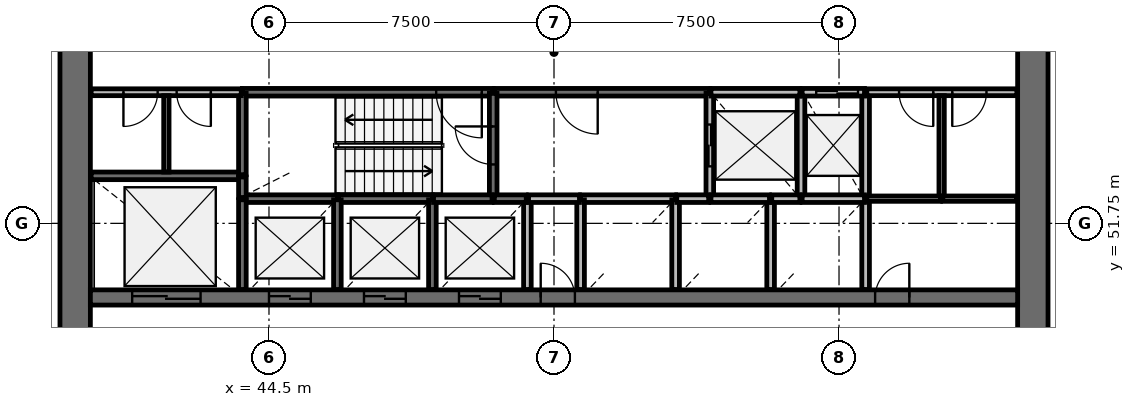
"""IFC4 building model, lengths in metres.
Left out: names, types, materials, properties, quantities, classifications, styles, units other than length and angle.
Written with IfcOpenShell. Run it as: python <this file> out.ifc"""

import sys

from ifc_helpers import new_model, si_unit, direction, frame, frame_2d, origin, place, context, subcontext, project, spatial, rectangle, extrude, source, transform, mapped, element, fill, save


model = new_model("IFC4")
c1 = context("Model", 3, precision=1e-05, world=origin(), true_north=direction((0.0, 1.0)))
c2 = subcontext(c1, "Body", "Model", "MODEL_VIEW")
j1 = project(units=[si_unit("LENGTHUNIT", "METRE"), si_unit("PLANEANGLEUNIT", "RADIAN")], contexts=[c1])
p1 = place(None, origin())
s1 = spatial("IfcSite", under=j1, at=p1, CompositionType="ELEMENT")
p2 = place(p1, origin())
s2 = spatial("IfcBuilding", under=s1, at=p2, CompositionType="ELEMENT")
p3 = place(p2, frame((0.0, 0.0, 104.4)))
s3 = spatial("IfcBuildingStorey", under=s2, at=p3, CompositionType="ELEMENT", Elevation=104.4)
p4 = place(p3, frame((64.6, 38.0, 0.0), z_axis=(0.0, 0.0, 1.0), x_axis=(0.0, 1.0, 0.0)))
e1 = element("IfcWall", 1, at=p4, inside=s3, PredefinedType="SHEAR", context=c2, shape_type="SweptSolid", body=[
    extrude(rectangle(XDim=20.0, YDim=0.8, at=frame_2d((10.0, 0.0))), origin(), (0.0, 0.0, 1.0), 4.1),
])
p5 = place(p4, frame((9.1, 0.0, 0.0)))
e2 = element("IfcOpeningElement", 2, at=p5, cuts=e1, PredefinedType="OPENING", context=c2, shape_type="SweptSolid", body=[
    extrude(rectangle(XDim=1.8, YDim=2.1, at=frame_2d((0.9, 1.05))), frame((0.0, 0.41, 0.0), z_axis=(0.0, -1.0, 0.0), x_axis=(1.0, 0.0, 0.0)), (0.0, 0.0, 1.0), 0.82),
])
p6 = place(p3, frame((39.4, 58.0, 0.0), z_axis=(0.0, 0.0, 1.0), x_axis=(0.0, -1.0, 0.0)))
e3 = element("IfcWall", 3, at=p6, inside=s3, PredefinedType="SHEAR", context=c2, shape_type="SweptSolid", body=[
    extrude(rectangle(XDim=20.0, YDim=0.8, at=frame_2d((10.0, 0.0))), origin(), (0.0, 0.0, 1.0), 4.1),
])
p7 = place(p6, frame((9.1, 0.0, 0.0)))
e4 = element("IfcOpeningElement", 4, at=p7, cuts=e3, PredefinedType="OPENING", context=c2, shape_type="SweptSolid", body=[
    extrude(rectangle(XDim=1.8, YDim=2.1, at=frame_2d((0.9, 1.05))), frame((0.0, 0.41, 0.0), z_axis=(0.0, -1.0, 0.0), x_axis=(1.0, 0.0, 0.0)), (0.0, 0.0, 1.0), 0.82),
])
p8 = place(p3, frame((39.8, 49.8, 0.0), z_axis=(0.0, 0.0, 1.0), x_axis=(1.0, 0.0, 0.0)))
e5 = element("IfcWall", 5, at=p8, inside=s3, PredefinedType="SHEAR", context=c2, shape_type="SweptSolid", body=[
    extrude(rectangle(XDim=24.4, YDim=0.4, at=frame_2d((12.2, 0.0))), origin(), (0.0, 0.0, 1.0), 4.1),
])
p9 = place(p8, frame((4.7, 0.0, 0.0)))
e6 = element("IfcOpeningElement", 6, at=p9, cuts=e5, PredefinedType="OPENING", context=c2, shape_type="SweptSolid", body=[
    extrude(rectangle(XDim=1.1, YDim=2.1, at=frame_2d((0.55, 1.05))), frame((0.0, 0.21, 0.0), z_axis=(0.0, -1.0, 0.0), x_axis=(1.0, 0.0, 0.0)), (0.0, 0.0, 1.0), 0.42),
])
p10 = place(p8, frame((7.2, 0.0, 0.0)))
e7 = element("IfcOpeningElement", 7, at=p10, cuts=e5, PredefinedType="OPENING", context=c2, shape_type="SweptSolid", body=[
    extrude(rectangle(XDim=1.1, YDim=2.1, at=frame_2d((0.55, 1.05))), frame((0.0, 0.21, 0.0), z_axis=(0.0, -1.0, 0.0), x_axis=(1.0, 0.0, 0.0)), (0.0, 0.0, 1.0), 0.42),
])
p11 = place(p8, frame((9.7, 0.0, 0.0)))
e8 = element("IfcOpeningElement", 8, at=p11, cuts=e5, PredefinedType="OPENING", context=c2, shape_type="SweptSolid", body=[
    extrude(rectangle(XDim=1.1, YDim=2.1, at=frame_2d((0.55, 1.05))), frame((0.0, 0.21, 0.0), z_axis=(0.0, -1.0, 0.0), x_axis=(1.0, 0.0, 0.0)), (0.0, 0.0, 1.0), 0.42),
])
p12 = place(p8, frame((1.1, 0.0, 0.0)))
e9 = element("IfcOpeningElement", 9, at=p12, cuts=e5, PredefinedType="OPENING", context=c2, shape_type="SweptSolid", body=[
    extrude(rectangle(XDim=1.8, YDim=2.4, at=frame_2d((0.9, 1.2))), frame((0.0, 0.21, 0.0), z_axis=(0.0, -1.0, 0.0), x_axis=(1.0, 0.0, 0.0)), (0.0, 0.0, 1.0), 0.42),
])
p13 = place(p8, frame((20.65, 0.0, 0.0)))
e10 = element("IfcOpeningElement", 10, at=p13, cuts=e5, PredefinedType="OPENING", context=c2, shape_type="SweptSolid", body=[
    extrude(rectangle(XDim=0.9, YDim=2.1, at=frame_2d((0.45, 1.05))), frame((0.0, 0.21, 0.0), z_axis=(0.0, -1.0, 0.0), x_axis=(1.0, 0.0, 0.0)), (0.0, 0.0, 1.0), 0.42),
])
p14 = place(p8, frame((11.85, 0.0, 0.0)))
e11 = element("IfcOpeningElement", 11, at=p14, cuts=e5, PredefinedType="OPENING", context=c2, shape_type="SweptSolid", body=[
    extrude(rectangle(XDim=0.9, YDim=2.1, at=frame_2d((0.45, 1.05))), frame((0.0, 0.21, 0.0), z_axis=(0.0, -1.0, 0.0), x_axis=(1.0, 0.0, 0.0)), (0.0, 0.0, 1.0), 0.42),
])
p15 = place(p3, frame((50.4, 55.2, 0.0), z_axis=(0.0, 0.0, 1.0), x_axis=(-1.0, 0.0, 0.0)))
e12 = element("IfcWall", 12, at=p15, inside=s3, PredefinedType="SOLIDWALL", context=c2, shape_type="SweptSolid", body=[
    extrude(rectangle(XDim=6.6, YDim=0.2, at=frame_2d((3.3, 0.0))), origin(), (0.0, 0.0, 1.0), 3.7),
])
p16 = place(p15, frame((0.3, 0.0, 0.0)))
e13 = element("IfcOpeningElement", 13, at=p16, cuts=e12, PredefinedType="OPENING", context=c2, shape_type="SweptSolid", body=[
    extrude(rectangle(XDim=1.2, YDim=2.1, at=frame_2d((0.6, 1.05))), frame((0.0, 0.11, 0.0), z_axis=(0.0, -1.0, 0.0), x_axis=(1.0, 0.0, 0.0)), (0.0, 0.0, 1.0), 0.22),
])
p17 = place(p3, frame((56.1, 55.2, 0.0), z_axis=(0.0, 0.0, 1.0), x_axis=(-1.0, 0.0, 0.0)))
e14 = element("IfcWall", 14, at=p17, inside=s3, PredefinedType="SOLIDWALL", context=c2, shape_type="SweptSolid", body=[
    extrude(rectangle(XDim=5.67, YDim=0.2, at=frame_2d((2.835, 0.0))), origin(), (0.0, 0.0, 1.0), 3.7),
])
p18 = place(p17, frame((2.95, 0.0, 0.0)))
e15 = element("IfcOpeningElement", 15, at=p18, cuts=e14, PredefinedType="OPENING", context=c2, shape_type="SweptSolid", body=[
    extrude(rectangle(XDim=1.1, YDim=2.1, at=frame_2d((0.55, 1.05))), frame((0.0, 0.11, 0.0), z_axis=(0.0, -1.0, 0.0), x_axis=(1.0, 0.0, 0.0)), (0.0, 0.0, 1.0), 0.22),
])
p19 = place(p3, frame((43.8, 53.0, 0.0), z_axis=(0.0, 0.0, 1.0), x_axis=(-1.0, 0.0, 0.0)))
e16 = element("IfcWall", 16, at=p19, inside=s3, PredefinedType="SOLIDWALL", context=c2, shape_type="SweptSolid", body=[
    extrude(rectangle(XDim=3.98, YDim=0.2, at=frame_2d((1.99, 0.0))), origin(), (0.0, 0.0, 1.0), 3.7),
])
p20 = place(p3, frame((50.4, 52.4, 0.0), z_axis=(0.0, 0.0, 1.0), x_axis=(0.0, 1.0, 0.0)))
e17 = element("IfcWall", 17, at=p20, inside=s3, PredefinedType="SOLIDWALL", context=c2, shape_type="SweptSolid", body=[
    extrude(rectangle(XDim=2.77, YDim=0.2, at=frame_2d((1.385, 0.0))), origin(), (0.0, 0.0, 1.0), 3.7),
])
p21 = place(p20, frame((0.9, 0.0, 0.0)))
e18 = element("IfcOpeningElement", 18, at=p21, cuts=e17, PredefinedType="OPENING", context=c2, shape_type="SweptSolid", body=[
    extrude(rectangle(XDim=1.0, YDim=2.1, at=frame_2d((0.5, 1.05))), frame((0.0, 0.11, 0.0), z_axis=(0.0, -1.0, 0.0), x_axis=(1.0, 0.0, 0.0)), (0.0, 0.0, 1.0), 0.22),
])
p22 = place(p3, frame((56.1, 55.17, 0.0), z_axis=(0.0, 0.0, 1.0), x_axis=(0.0, -1.0, 0.0)))
e19 = element("IfcWall", 19, at=p22, inside=s3, PredefinedType="SOLIDWALL", context=c2, shape_type="SweptSolid", body=[
    extrude(rectangle(XDim=2.77, YDim=0.2, at=frame_2d((1.385, 0.0))), origin(), (0.0, 0.0, 1.0), 3.7),
])
p23 = place(p22, frame((0.82, 0.0, 0.0)))
e20 = element("IfcOpeningElement", 20, at=p23, cuts=e19, PredefinedType="OPENING", context=c2, shape_type="SweptSolid", body=[
    extrude(rectangle(XDim=1.1, YDim=2.1, at=frame_2d((0.55, 1.05))), frame((0.0, 0.11, 0.0), z_axis=(0.0, -1.0, 0.0), x_axis=(1.0, 0.0, 0.0)), (0.0, 0.0, 1.0), 0.22),
])
for number, where, z_axis, x_axis in (
    (21, (58.5, 52.4, 0.0), (0.0, 0.0, 1.0), (0.0, 1.0, 0.0)),
    (22, (60.2, 52.4, 0.0), (0.0, 0.0, 1.0), (0.0, 1.0, 0.0)),
):
    element("IfcWall", number, at=place(p3, frame(where, z_axis=z_axis, x_axis=x_axis)), inside=s3, PredefinedType="SOLIDWALL", context=c2, shape_type="SweptSolid", body=[
        extrude(rectangle(XDim=2.8, YDim=0.2, at=frame_2d((1.4, 0.0))), origin(), (0.0, 0.0, 1.0), 3.7),
    ])
p24 = place(p3, frame((46.3, 52.4, 0.0), z_axis=(0.0, 0.0, 1.0), x_axis=(-1.0, 0.0, 0.0)))
e23 = element("IfcWall", 23, at=p24, inside=s3, PredefinedType="SOLIDWALL", context=c2, shape_type="SweptSolid", body=[
    extrude(rectangle(XDim=2.5, YDim=0.2, at=frame_2d((1.25, 0.0))), origin(), (0.0, 0.0, 1.0), 3.7),
])
p25 = place(p3, frame((48.8, 52.4, 0.0), z_axis=(0.0, 0.0, 1.0), x_axis=(-1.0, 0.0, 0.0)))
e24 = element("IfcWall", 24, at=p25, inside=s3, PredefinedType="SOLIDWALL", context=c2, shape_type="SweptSolid", body=[
    extrude(rectangle(XDim=2.47, YDim=0.2, at=frame_2d((1.235, 0.0))), origin(), (0.0, 0.0, 1.0), 3.7),
])
p26 = place(p3, frame((55.2, 52.4, 0.0), z_axis=(0.0, 0.0, 1.0), x_axis=(-1.0, 0.0, 0.0)))
e25 = element("IfcWall", 25, at=p26, inside=s3, PredefinedType="SOLIDWALL", context=c2, shape_type="SweptSolid", body=[
    extrude(rectangle(XDim=2.5, YDim=0.2, at=frame_2d((1.25, 0.0))), origin(), (0.0, 0.0, 1.0), 3.7),
])
p27 = place(p3, frame((58.47, 55.2, 0.0), z_axis=(0.0, 0.0, 1.0), x_axis=(-1.0, 0.0, 0.0)))
e26 = element("IfcWall", 26, at=p27, inside=s3, PredefinedType="SOLIDWALL", context=c2, shape_type="SweptSolid", body=[
    extrude(rectangle(XDim=2.34, YDim=0.2, at=frame_2d((1.17, 0.0))), origin(), (0.0, 0.0, 1.0), 3.7),
])
for number, where, z_axis, x_axis in (
    (27, (43.8, 52.37, 0.0), (0.0, 0.0, 1.0), (0.0, -1.0, 0.0)),
    (28, (46.3, 50.01, 0.0), (0.0, 0.0, 1.0), (0.0, 1.0, 0.0)),
    (29, (48.8, 50.01, 0.0), (0.0, 0.0, 1.0), (0.0, 1.0, 0.0)),
):
    element("IfcWall", number, at=place(p3, frame(where, z_axis=z_axis, x_axis=x_axis)), inside=s3, PredefinedType="SOLIDWALL", context=c2, shape_type="SweptSolid", body=[
        extrude(rectangle(XDim=2.36, YDim=0.2, at=frame_2d((1.18, 0.0))), origin(), (0.0, 0.0, 1.0), 3.7),
    ])
p28 = place(p3, frame((51.3, 50.01, 0.0), z_axis=(0.0, 0.0, 1.0), x_axis=(0.0, 1.0, 0.0)))
e30 = element("IfcWall", 30, at=p28, inside=s3, PredefinedType="SOLIDWALL", context=c2, shape_type="SweptSolid", body=[
    extrude(rectangle(XDim=2.39, YDim=0.2, at=frame_2d((1.195, 0.0))), origin(), (0.0, 0.0, 1.0), 3.7),
])
for number, where, z_axis, x_axis in (
    (31, (52.7, 52.37, 0.0), (0.0, 0.0, 1.0), (0.0, -1.0, 0.0)),
    (32, (55.2, 50.01, 0.0), (0.0, 0.0, 1.0), (0.0, 1.0, 0.0)),
):
    element("IfcWall", number, at=place(p3, frame(where, z_axis=z_axis, x_axis=x_axis)), inside=s3, PredefinedType="SOLIDWALL", context=c2, shape_type="SweptSolid", body=[
        extrude(rectangle(XDim=2.36, YDim=0.2, at=frame_2d((1.18, 0.0))), origin(), (0.0, 0.0, 1.0), 3.7),
    ])
p29 = place(p3, frame((57.7, 50.01, 0.0), z_axis=(0.0, 0.0, 1.0), x_axis=(0.0, 1.0, 0.0)))
e33 = element("IfcWall", 33, at=p29, inside=s3, PredefinedType="SOLIDWALL", context=c2, shape_type="SweptSolid", body=[
    extrude(rectangle(XDim=2.39, YDim=0.2, at=frame_2d((1.195, 0.0))), origin(), (0.0, 0.0, 1.0), 3.7),
])
p30 = place(p3, frame((60.2, 50.01, 0.0), z_axis=(0.0, 0.0, 1.0), x_axis=(0.0, 1.0, 0.0)))
e34 = element("IfcWall", 34, at=p30, inside=s3, PredefinedType="SOLIDWALL", context=c2, shape_type="SweptSolid", body=[
    extrude(rectangle(XDim=2.36, YDim=0.2, at=frame_2d((1.18, 0.0))), origin(), (0.0, 0.0, 1.0), 3.7),
])
p31 = place(p3, frame((43.8, 55.17, 0.0), z_axis=(0.0, 0.0, 1.0), x_axis=(0.0, -1.0, 0.0)))
e35 = element("IfcWall", 35, at=p31, inside=s3, PredefinedType="SOLIDWALL", context=c2, shape_type="SweptSolid", body=[
    extrude(rectangle(XDim=2.14, YDim=0.2, at=frame_2d((1.07, 0.0))), origin(), (0.0, 0.0, 1.0), 3.7),
])
p32 = place(p3, frame((60.17, 52.4, 0.0), z_axis=(0.0, 0.0, 1.0), x_axis=(-1.0, 0.0, 0.0)))
e36 = element("IfcWall", 36, at=p32, inside=s3, PredefinedType="SOLIDWALL", context=c2, shape_type="SweptSolid", body=[
    extrude(rectangle(XDim=1.64, YDim=0.2, at=frame_2d((0.82, 0.0))), origin(), (0.0, 0.0, 1.0), 3.7),
])
p33 = place(p3, frame((60.17, 55.2, 0.0), z_axis=(0.0, 0.0, 1.0), x_axis=(-1.0, 0.0, 0.0)))
e37 = element("IfcWall", 37, at=p33, inside=s3, PredefinedType="SOLIDWALL", context=c2, shape_type="SweptSolid", body=[
    extrude(rectangle(XDim=1.64, YDim=0.2, at=frame_2d((0.82, 0.0))), origin(), (0.0, 0.0, 1.0), 3.7),
])
p34 = place(p33, frame((0.17, 0.0, 0.0)))
e38 = element("IfcOpeningElement", 38, at=p34, cuts=e37, PredefinedType="OPENING", context=c2, shape_type="SweptSolid", body=[
    extrude(rectangle(XDim=1.1, YDim=2.1, at=frame_2d((0.55, 1.05))), frame((0.0, 0.11, 0.0), z_axis=(0.0, -1.0, 0.0), x_axis=(1.0, 0.0, 0.0)), (0.0, 0.0, 1.0), 0.22),
])
for number, where, z_axis, x_axis in (
    (39, (50.37, 52.4, 0.0), (0.0, 0.0, 1.0), (-1.0, 0.0, 0.0)),
    (40, (57.67, 52.4, 0.0), (0.0, 0.0, 1.0), (-1.0, 0.0, 0.0)),
):
    element("IfcWall", number, at=place(p3, frame(where, z_axis=z_axis, x_axis=x_axis)), inside=s3, PredefinedType="SOLIDWALL", context=c2, shape_type="SweptSolid", body=[
        extrude(rectangle(XDim=1.54, YDim=0.2, at=frame_2d((0.77, 0.0))), origin(), (0.0, 0.0, 1.0), 3.7),
    ])
p35 = place(p3, frame((51.33, 52.4, 0.0), z_axis=(0.0, 0.0, 1.0), x_axis=(1.0, 0.0, 0.0)))
e41 = element("IfcWall", 41, at=p35, inside=s3, PredefinedType="SOLIDWALL", context=c2, shape_type="SweptSolid", body=[
    extrude(rectangle(XDim=1.34, YDim=0.2, at=frame_2d((0.67, 0.0))), origin(), (0.0, 0.0, 1.0), 3.7),
])
for number, where, z_axis, x_axis in (
    (42, (51.27, 52.4, 0.0), (0.0, 0.0, 1.0), (-1.0, 0.0, 0.0)),
    (43, (56.07, 52.4, 0.0), (0.0, 0.0, 1.0), (-1.0, 0.0, 0.0)),
):
    element("IfcWall", number, at=place(p3, frame(where, z_axis=z_axis, x_axis=x_axis)), inside=s3, PredefinedType="SOLIDWALL", context=c2, shape_type="SweptSolid", body=[
        extrude(rectangle(XDim=0.84, YDim=0.2, at=frame_2d((0.42, 0.0))), origin(), (0.0, 0.0, 1.0), 3.7),
    ])
p36 = place(p3, frame((58.47, 52.4, 0.0), z_axis=(0.0, 0.0, 1.0), x_axis=(-1.0, 0.0, 0.0)))
e44 = element("IfcWall", 44, at=p36, inside=s3, PredefinedType="SOLIDWALL", context=c2, shape_type="SweptSolid", body=[
    extrude(rectangle(XDim=0.74, YDim=0.2, at=frame_2d((0.37, 0.0))), origin(), (0.0, 0.0, 1.0), 3.7),
])
p37 = place(p3, frame((43.8, 52.43, 0.0), z_axis=(0.0, 0.0, 1.0), x_axis=(0.0, 1.0, 0.0)))
e45 = element("IfcWall", 45, at=p37, inside=s3, PredefinedType="SOLIDWALL", context=c2, shape_type="SweptSolid", body=[
    extrude(rectangle(XDim=0.54, YDim=0.2, at=frame_2d((0.27, 0.0))), origin(), (0.0, 0.0, 1.0), 3.7),
])
p38 = place(p3, frame((64.18, 55.2, 0.0), z_axis=(0.0, 0.0, 1.0), x_axis=(-1.0, 0.0, 0.0)))
e46 = element("IfcWall", 46, at=p38, inside=s3, PredefinedType="PARTITIONING", context=c2, shape_type="SweptSolid", body=[
    extrude(rectangle(XDim=3.95, YDim=0.18, at=frame_2d((1.975, 0.0))), origin(), (0.0, 0.0, 1.0), 3.7),
])
p39 = place(p38, frame((2.2, 0.0, 0.0)))
e47 = element("IfcOpeningElement", 47, at=p39, cuts=e46, PredefinedType="OPENING", context=c2, shape_type="SweptSolid", body=[
    extrude(rectangle(XDim=0.9, YDim=2.1, at=frame_2d((0.45, 1.05))), frame((0.0, 0.1, 0.0), z_axis=(0.0, -1.0, 0.0), x_axis=(1.0, 0.0, 0.0)), (0.0, 0.0, 1.0), 0.2),
])
p40 = place(p38, frame((0.8, 0.0, 0.0)))
e48 = element("IfcOpeningElement", 48, at=p40, cuts=e46, PredefinedType="OPENING", context=c2, shape_type="SweptSolid", body=[
    extrude(rectangle(XDim=0.9, YDim=2.1, at=frame_2d((0.45, 1.05))), frame((0.0, 0.1, 0.0), z_axis=(0.0, -1.0, 0.0), x_axis=(1.0, 0.0, 0.0)), (0.0, 0.0, 1.0), 0.2),
])
p41 = place(p3, frame((43.77, 55.2, 0.0), z_axis=(0.0, 0.0, 1.0), x_axis=(-1.0, 0.0, 0.0)))
e49 = element("IfcWall", 49, at=p41, inside=s3, PredefinedType="PARTITIONING", context=c2, shape_type="SweptSolid", body=[
    extrude(rectangle(XDim=3.95, YDim=0.18, at=frame_2d((1.975, 0.0))), origin(), (0.0, 0.0, 1.0), 3.7),
])
p42 = place(p41, frame((2.2, 0.0, 0.0)))
e50 = element("IfcOpeningElement", 50, at=p42, cuts=e49, PredefinedType="OPENING", context=c2, shape_type="SweptSolid", body=[
    extrude(rectangle(XDim=0.9, YDim=2.1, at=frame_2d((0.45, 1.05))), frame((0.0, 0.1, 0.0), z_axis=(0.0, -1.0, 0.0), x_axis=(1.0, 0.0, 0.0)), (0.0, 0.0, 1.0), 0.2),
])
p43 = place(p41, frame((0.8, 0.0, 0.0)))
e51 = element("IfcOpeningElement", 51, at=p43, cuts=e49, PredefinedType="OPENING", context=c2, shape_type="SweptSolid", body=[
    extrude(rectangle(XDim=0.9, YDim=2.1, at=frame_2d((0.45, 1.05))), frame((0.0, 0.1, 0.0), z_axis=(0.0, -1.0, 0.0), x_axis=(1.0, 0.0, 0.0)), (0.0, 0.0, 1.0), 0.2),
])
p44 = place(p3, frame((62.2, 52.4, 0.0), z_axis=(0.0, 0.0, 1.0), x_axis=(0.0, 1.0, 0.0)))
e52 = element("IfcWall", 52, at=p44, inside=s3, PredefinedType="PARTITIONING", context=c2, shape_type="SweptSolid", body=[
    extrude(rectangle(XDim=2.71, YDim=0.14, at=frame_2d((1.355, 0.0))), origin(), (0.0, 0.0, 1.0), 2.9),
])
p45 = place(p3, frame((41.8, 53.1, 0.0), z_axis=(0.0, 0.0, 1.0), x_axis=(0.0, 1.0, 0.0)))
e53 = element("IfcWall", 53, at=p45, inside=s3, PredefinedType="PARTITIONING", context=c2, shape_type="SweptSolid", body=[
    extrude(rectangle(XDim=2.01, YDim=0.14, at=frame_2d((1.005, 0.0))), origin(), (0.0, 0.0, 1.0), 2.9),
])
p46 = place(p3, frame((62.17, 52.4, 0.0), z_axis=(0.0, 0.0, 1.0), x_axis=(-1.0, 0.0, 0.0)))
e54 = element("IfcWall", 54, at=p46, inside=s3, PredefinedType="PARTITIONING", context=c2, shape_type="SweptSolid", body=[
    extrude(rectangle(XDim=1.94, YDim=0.14, at=frame_2d((0.97, 0.0))), origin(), (0.0, 0.0, 1.0), 2.9),
])
p47 = place(p3, frame((64.18, 52.4, 0.0), z_axis=(0.0, 0.0, 1.0), x_axis=(-1.0, 0.0, 0.0)))
e55 = element("IfcWall", 55, at=p47, inside=s3, PredefinedType="PARTITIONING", context=c2, shape_type="SweptSolid", body=[
    extrude(rectangle(XDim=1.95, YDim=0.14, at=frame_2d((0.975, 0.0))), origin(), (0.0, 0.0, 1.0), 2.9),
])
m1 = source(origin(), c2, "Body", "SweptSolid", [
    extrude(rectangle(XDim=1.1, YDim=2.1, at=frame_2d((0.55, 1.05))), frame((0.0, 0.025, 0.0), z_axis=(0.0, -1.0, 0.0), x_axis=(1.0, 0.0, 0.0)), (0.0, 0.0, 1.0), 0.05),
])
p48 = place(p9, origin())
e56 = element("IfcDoor", 56, at=p48, inside=s3, OperationType="DOUBLE_DOOR_SLIDING", PredefinedType="USERDEFINED", context=c2, shape_type="MappedRepresentation", body=[
    mapped(m1, transform((0.0, 0.0, 0.0), scale=1.0)),
])
fill(e6, e56)
p49 = place(p10, origin())
e57 = element("IfcDoor", 57, at=p49, inside=s3, OperationType="DOUBLE_DOOR_SLIDING", PredefinedType="USERDEFINED", context=c2, shape_type="MappedRepresentation", body=[
    mapped(m1, transform((0.0, 0.0, 0.0), scale=1.0)),
])
fill(e7, e57)
p50 = place(p11, origin())
e58 = element("IfcDoor", 58, at=p50, inside=s3, OperationType="DOUBLE_DOOR_SLIDING", PredefinedType="USERDEFINED", context=c2, shape_type="MappedRepresentation", body=[
    mapped(m1, transform((0.0, 0.0, 0.0), scale=1.0)),
])
fill(e8, e58)
p51 = place(p23, origin())
e59 = element("IfcDoor", 59, at=p51, inside=s3, OperationType="DOUBLE_DOOR_SLIDING", PredefinedType="USERDEFINED", context=c2, shape_type="MappedRepresentation", body=[
    mapped(m1, transform((0.0, 0.0, 0.0), scale=1.0)),
])
fill(e20, e59)
p52 = place(p34, origin())
e60 = element("IfcDoor", 60, at=p52, inside=s3, OperationType="DOUBLE_DOOR_SLIDING", PredefinedType="USERDEFINED", context=c2, shape_type="MappedRepresentation", body=[
    mapped(m1, transform((0.0, 0.0, 0.0), scale=1.0)),
])
fill(e38, e60)
m2 = source(origin(), c2, "Body", "SweptSolid", [
    extrude(rectangle(XDim=1.8, YDim=2.4, at=frame_2d((0.9, 1.2))), frame((0.0, 0.025, 0.0), z_axis=(0.0, -1.0, 0.0), x_axis=(1.0, 0.0, 0.0)), (0.0, 0.0, 1.0), 0.05),
])
p53 = place(p12, origin())
e61 = element("IfcDoor", 61, at=p53, inside=s3, OperationType="DOUBLE_DOOR_SLIDING", PredefinedType="USERDEFINED", context=c2, shape_type="MappedRepresentation", body=[
    mapped(m2, transform((0.0, 0.0, 0.0), scale=1.0)),
])
fill(e9, e61)
m3 = source(origin(), c2, "Body", "SweptSolid", [
    extrude(rectangle(XDim=1.2, YDim=2.1, at=frame_2d((0.6, 1.05))), frame((0.0, 0.025, 0.0), z_axis=(0.0, -1.0, 0.0), x_axis=(1.0, 0.0, 0.0)), (0.0, 0.0, 1.0), 0.05),
])
p54 = place(p16, origin())
e62 = element("IfcDoor", 62, at=p54, inside=s3, OperationType="SINGLE_SWING_LEFT", PredefinedType="DOOR", context=c2, shape_type="MappedRepresentation", body=[
    mapped(m3, transform((0.0, 0.0, 0.0), scale=1.0)),
])
fill(e13, e62)
m4 = source(origin(), c2, "Body", "SweptSolid", [
    extrude(rectangle(XDim=1.0, YDim=2.1, at=frame_2d((0.5, 1.05))), frame((0.0, 0.025, 0.0), z_axis=(0.0, -1.0, 0.0), x_axis=(1.0, 0.0, 0.0)), (0.0, 0.0, 1.0), 0.05),
])
p55 = place(p21, origin())
e63 = element("IfcDoor", 63, at=p55, inside=s3, OperationType="SINGLE_SWING_RIGHT", PredefinedType="DOOR", context=c2, shape_type="MappedRepresentation", body=[
    mapped(m4, transform((0.0, 0.0, 0.0), scale=1.0)),
])
fill(e18, e63)
m5 = source(origin(), c2, "Body", "SweptSolid", [
    extrude(rectangle(XDim=1.1, YDim=2.1, at=frame_2d((0.55, 1.05))), frame((0.0, 0.025, 0.0), z_axis=(0.0, -1.0, 0.0), x_axis=(1.0, 0.0, 0.0)), (0.0, 0.0, 1.0), 0.05),
])
p56 = place(p18, origin())
e64 = element("IfcDoor", 64, at=p56, inside=s3, OperationType="SINGLE_SWING_LEFT", PredefinedType="DOOR", context=c2, shape_type="MappedRepresentation", body=[
    mapped(m5, transform((0.0, 0.0, 0.0), scale=1.0)),
])
fill(e15, e64)
m6 = source(origin(), c2, "Body", "SweptSolid", [
    extrude(rectangle(XDim=0.9, YDim=2.1, at=frame_2d((0.45, 1.05))), frame((0.0, 0.025, 0.0), z_axis=(0.0, -1.0, 0.0), x_axis=(1.0, 0.0, 0.0)), (0.0, 0.0, 1.0), 0.05),
])
p57 = place(p42, origin())
e65 = element("IfcDoor", 65, at=p57, inside=s3, OperationType="SINGLE_SWING_RIGHT", PredefinedType="DOOR", context=c2, shape_type="MappedRepresentation", body=[
    mapped(m6, transform((0.0, 0.0, 0.0), scale=1.0)),
])
fill(e50, e65)
p58 = place(p43, origin())
e66 = element("IfcDoor", 66, at=p58, inside=s3, OperationType="SINGLE_SWING_LEFT", PredefinedType="DOOR", context=c2, shape_type="MappedRepresentation", body=[
    mapped(m6, transform((0.0, 0.0, 0.0), scale=1.0)),
])
fill(e51, e66)
p59 = place(p13, origin())
e67 = element("IfcDoor", 67, at=p59, inside=s3, OperationType="SINGLE_SWING_RIGHT", PredefinedType="DOOR", context=c2, shape_type="MappedRepresentation", body=[
    mapped(m6, transform((0.0, 0.0, 0.0), scale=1.0)),
])
fill(e10, e67)
p60 = place(p39, origin())
e68 = element("IfcDoor", 68, at=p60, inside=s3, OperationType="SINGLE_SWING_LEFT", PredefinedType="DOOR", context=c2, shape_type="MappedRepresentation", body=[
    mapped(m6, transform((0.0, 0.0, 0.0), scale=1.0)),
])
fill(e47, e68)
p61 = place(p40, origin())
e69 = element("IfcDoor", 69, at=p61, inside=s3, OperationType="SINGLE_SWING_RIGHT", PredefinedType="DOOR", context=c2, shape_type="MappedRepresentation", body=[
    mapped(m6, transform((0.0, 0.0, 0.0), scale=1.0)),
])
fill(e48, e69)
p62 = place(p14, origin())
e70 = element("IfcDoor", 70, at=p62, inside=s3, OperationType="SINGLE_SWING_LEFT", PredefinedType="DOOR", context=c2, shape_type="MappedRepresentation", body=[
    mapped(m6, transform((0.0, 0.0, 0.0), scale=1.0)),
])
fill(e11, e70)
save(model, sys.argv[1])
